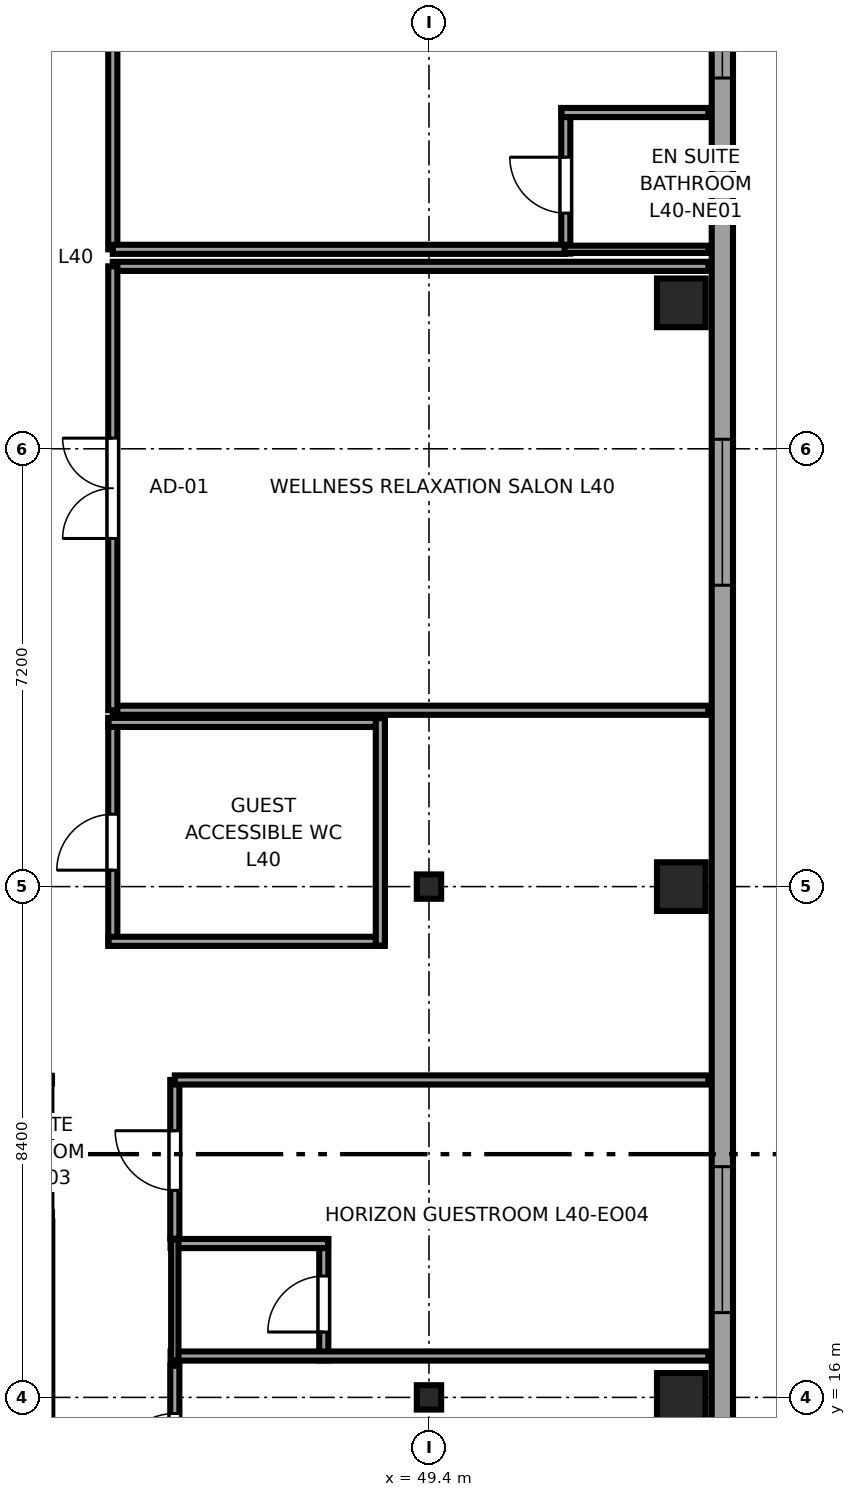
"""IFC4 building model, lengths in metres.
Left out: names, types, materials, properties, quantities, classifications, styles, units other than length and angle.
Written with IfcOpenShell. Run it as: python <this file> out.ifc"""

import sys

from ifc_helpers import new_model, si_unit, direction, frame, frame_2d, origin, origin_2d, place, context, subcontext, project, spatial, rectangle, i_section, extrude, source, transform, mapped, element, fill, save


model = new_model("IFC4")
c1 = context("Model", 3, precision=1e-05, world=origin(), true_north=direction((0.0, 1.0)))
c2 = subcontext(c1, "Body", "Model", "MODEL_VIEW")
j1 = project(units=[si_unit("LENGTHUNIT", "METRE"), si_unit("PLANEANGLEUNIT", "RADIAN")], contexts=[c1])
p1 = place(None, origin())
s1 = spatial("IfcSite", under=j1, at=p1, CompositionType="ELEMENT")
p2 = place(p1, origin())
s2 = spatial("IfcBuilding", under=s1, at=p2, CompositionType="ELEMENT")
p3 = place(p2, frame((0.0, 0.0, 154.15)))
s3 = spatial("IfcBuildingStorey", under=s2, at=p3, CompositionType="ELEMENT", Elevation=154.15)
m1 = source(origin(), c2, "Body", "SweptSolid", [
    extrude(i_section(OverallWidth=0.4, OverallDepth=0.4, WebThickness=0.02, FlangeThickness=0.035, at=origin_2d()), origin(), (0.0, 0.0, 1.0), 3.55),
])
for number, where, z_axis, x_axis in (
    (1, (49.4, 16.0, 0.0), (0.0, 0.0, 1.0), (1.0, 0.0, 0.0)),
    (2, (49.4, 24.4, 0.0), (0.0, 0.0, 1.0), (1.0, 0.0, 0.0)),
):
    element("IfcColumn", number, at=place(p3, frame(where, z_axis=z_axis, x_axis=x_axis)), inside=s3, PredefinedType="COLUMN", context=c2, shape_type="MappedRepresentation", body=[
        mapped(m1, transform((0.0, 0.0, 0.0), x_axis=(1.0, 0.0, 0.0), y_axis=(0.0, 1.0, 0.0), z_axis=(0.0, 0.0, 1.0), scale=1.0)),
    ])
m2 = source(origin(), c2, "Body", "SweptSolid", [
    extrude(rectangle(XDim=0.8, YDim=0.8, at=origin_2d()), origin(), (0.0, 0.0, 1.0), 3.55),
])
for number, where, z_axis, x_axis in (
    (3, (53.55, 16.0, 0.0), (0.0, 0.0, 1.0), (1.0, 0.0, 0.0)),
    (4, (53.55, 24.4, 0.0), (0.0, 0.0, 1.0), (1.0, 0.0, 0.0)),
    (5, (53.55, 34.0, 0.0), (0.0, 0.0, 1.0), (1.0, 0.0, 0.0)),
):
    element("IfcColumn", number, at=place(p3, frame(where, z_axis=z_axis, x_axis=x_axis)), inside=s3, PredefinedType="COLUMN", context=c2, shape_type="MappedRepresentation", body=[
        mapped(m2, transform((0.0, 0.0, 0.0), x_axis=(1.0, 0.0, 0.0), y_axis=(0.0, 1.0, 0.0), z_axis=(0.0, 0.0, 1.0), scale=1.0)),
    ])
p4 = place(p3, frame((54.225, 7.017, 0.0), z_axis=(0.0, 0.0, 1.0), x_axis=(0.0, 1.0, 0.0)))
e6 = element("IfcWall", 6, at=p4, inside=s3, PredefinedType="SOLIDWALL", context=c2, shape_type="SweptSolid", body=[
    extrude(rectangle(XDim=34.566, YDim=0.35, at=frame_2d((17.283, 0.0))), origin(), (0.0, 0.0, 1.0), 3.37),
])
p5 = place(p4, frame((2.035, 0.0, 0.68)))
e7 = element("IfcOpeningElement", 7, at=p5, cuts=e6, PredefinedType="OPENING", context=c2, shape_type="SweptSolid", body=[
    extrude(rectangle(XDim=2.4, YDim=1.9, at=frame_2d((1.2, 0.95))), frame((0.0, 0.185, 0.0), z_axis=(0.0, -1.0, 0.0), x_axis=(1.0, 0.0, 0.0)), (0.0, 0.0, 1.0), 0.37),
])
p6 = place(p4, frame((5.656, 0.0, 0.68)))
e8 = element("IfcOpeningElement", 8, at=p6, cuts=e6, PredefinedType="OPENING", context=c2, shape_type="SweptSolid", body=[
    extrude(rectangle(XDim=2.4, YDim=1.9, at=frame_2d((1.2, 0.95))), frame((0.0, 0.185, 0.0), z_axis=(0.0, -1.0, 0.0), x_axis=(1.0, 0.0, 0.0)), (0.0, 0.0, 1.0), 0.37),
])
p7 = place(p4, frame((10.377, 0.0, 0.68)))
e9 = element("IfcOpeningElement", 9, at=p7, cuts=e6, PredefinedType="OPENING", context=c2, shape_type="SweptSolid", body=[
    extrude(rectangle(XDim=2.4, YDim=1.9, at=frame_2d((1.2, 0.95))), frame((0.0, 0.185, 0.0), z_axis=(0.0, -1.0, 0.0), x_axis=(1.0, 0.0, 0.0)), (0.0, 0.0, 1.0), 0.37),
])
p8 = place(p4, frame((22.339, 0.0, 0.68)))
e10 = element("IfcOpeningElement", 10, at=p8, cuts=e6, PredefinedType="OPENING", context=c2, shape_type="SweptSolid", body=[
    extrude(rectangle(XDim=2.4, YDim=1.9, at=frame_2d((1.2, 0.95))), frame((0.0, 0.185, 0.0), z_axis=(0.0, -1.0, 0.0), x_axis=(1.0, 0.0, 0.0)), (0.0, 0.0, 1.0), 0.37),
])
p9 = place(p4, frame((30.68, 0.0, 0.68)))
e11 = element("IfcOpeningElement", 11, at=p9, cuts=e6, PredefinedType="OPENING", context=c2, shape_type="SweptSolid", body=[
    extrude(rectangle(XDim=2.4, YDim=1.9, at=frame_2d((1.2, 0.95))), frame((0.0, 0.185, 0.0), z_axis=(0.0, -1.0, 0.0), x_axis=(1.0, 0.0, 0.0)), (0.0, 0.0, 1.0), 0.37),
])
p10 = place(p3, frame((47.67, 16.61, 0.0), z_axis=(0.0, 0.0, 1.0), x_axis=(0.0, 1.0, 0.0)))
e12 = element("IfcWall", 12, at=p10, inside=s3, PredefinedType="PARTITIONING", context=c2, shape_type="SweptSolid", body=[
    extrude(rectangle(XDim=1.99, YDim=0.15, at=frame_2d((0.995, 0.0))), origin(), (0.0, 0.0, 1.0), 3.37),
])
p11 = place(p10, frame((0.465, 0.0, 0.0)))
e13 = element("IfcOpeningElement", 13, at=p11, cuts=e12, PredefinedType="OPENING", context=c2, shape_type="SweptSolid", body=[
    extrude(rectangle(XDim=0.92, YDim=2.01, at=frame_2d((0.46, 1.005))), frame((0.0, 0.085, 0.0), z_axis=(0.0, -1.0, 0.0), x_axis=(1.0, 0.0, 0.0)), (0.0, 0.0, 1.0), 0.17),
])
p12 = place(p3, frame((45.15, 16.68, 0.0), z_axis=(0.0, 0.0, 1.0), x_axis=(1.0, 0.0, 0.0)))
e14 = element("IfcWall", 14, at=p12, inside=s3, PredefinedType="PARTITIONING", context=c2, shape_type="SweptSolid", body=[
    extrude(rectangle(XDim=8.845, YDim=0.15, at=frame_2d((4.423, 0.0))), origin(), (0.0, 0.0, 1.0), 3.37),
])
p13 = place(p3, frame((45.15, 18.53, 0.0), z_axis=(0.0, 0.0, 1.0), x_axis=(1.0, 0.0, 0.0)))
e15 = element("IfcWall", 15, at=p13, inside=s3, PredefinedType="PARTITIONING", context=c2, shape_type="SweptSolid", body=[
    extrude(rectangle(XDim=2.59, YDim=0.15, at=frame_2d((1.295, 0.0))), origin(), (0.0, 0.0, 1.0), 3.37),
])
p14 = place(p3, frame((45.22, 16.61, 0.0), z_axis=(0.0, 0.0, 1.0), x_axis=(0.0, 1.0, 0.0)))
e16 = element("IfcWall", 16, at=p14, inside=s3, PredefinedType="PLUMBINGWALL", context=c2, shape_type="SweptSolid", body=[
    extrude(rectangle(XDim=1.99, YDim=0.12, at=frame_2d((0.995, 0.0))), origin(), (0.0, 0.0, 1.0), 3.37),
])
p15 = place(p3, frame((51.65, 34.81, 0.0), z_axis=(0.0, 0.0, 1.0), x_axis=(0.0, 1.0, 0.0)))
e17 = element("IfcWall", 17, at=p15, inside=s3, PredefinedType="PARTITIONING", context=c2, shape_type="SweptSolid", body=[
    extrude(rectangle(XDim=2.39, YDim=0.15, at=frame_2d((1.195, 0.0))), origin(), (0.0, 0.0, 1.0), 3.37),
])
p16 = place(p15, frame((0.665, 0.0, 0.0)))
e18 = element("IfcOpeningElement", 18, at=p16, cuts=e17, PredefinedType="OPENING", context=c2, shape_type="SweptSolid", body=[
    extrude(rectangle(XDim=0.92, YDim=2.01, at=frame_2d((0.46, 1.005))), frame((0.0, 0.085, 0.0), z_axis=(0.0, -1.0, 0.0), x_axis=(1.0, 0.0, 0.0)), (0.0, 0.0, 1.0), 0.17),
])
p17 = place(p3, frame((51.58, 34.88, 0.0), z_axis=(0.0, 0.0, 1.0), x_axis=(1.0, 0.0, 0.0)))
e19 = element("IfcWall", 19, at=p17, inside=s3, PredefinedType="PLUMBINGWALL", context=c2, shape_type="SweptSolid", body=[
    extrude(rectangle(XDim=2.415, YDim=0.12, at=frame_2d((1.208, 0.0))), origin(), (0.0, 0.0, 1.0), 3.37),
])
p18 = place(p3, frame((51.58, 37.13, 0.0), z_axis=(0.0, 0.0, 1.0), x_axis=(1.0, 0.0, 0.0)))
e20 = element("IfcWall", 20, at=p18, inside=s3, PredefinedType="PARTITIONING", context=c2, shape_type="SweptSolid", body=[
    extrude(rectangle(XDim=2.415, YDim=0.15, at=frame_2d((1.208, 0.0))), origin(), (0.0, 0.0, 1.0), 3.37),
])
p19 = place(p3, frame((43.13, 15.28, 0.0), z_axis=(0.0, 0.0, 1.0), x_axis=(0.0, 1.0, 0.0)))
e21 = element("IfcWall", 21, at=p19, inside=s3, PredefinedType="PARTITIONING", context=c2, shape_type="SweptSolid", body=[
    extrude(rectangle(XDim=3.61, YDim=0.15, at=frame_2d((1.805, 0.0))), origin(), (0.0, 0.0, 1.0), 3.37),
])
p20 = place(p19, frame((1.295, 0.0, 0.0)))
e22 = element("IfcOpeningElement", 22, at=p20, cuts=e21, PredefinedType="OPENING", context=c2, shape_type="SweptSolid", body=[
    extrude(rectangle(XDim=0.98, YDim=2.12, at=frame_2d((0.49, 1.06))), frame((0.0, 0.085, 0.0), z_axis=(0.0, -1.0, 0.0), x_axis=(1.0, 0.0, 0.0)), (0.0, 0.0, 1.0), 0.17),
])
p21 = place(p3, frame((45.22, 14.01, 0.0), z_axis=(0.0, 0.0, 1.0), x_axis=(0.0, 1.0, 0.0)))
e23 = element("IfcWall", 23, at=p21, inside=s3, PredefinedType="PARTITIONING", context=c2, shape_type="SweptSolid", body=[
    extrude(rectangle(XDim=2.51, YDim=0.15, at=frame_2d((1.255, 0.0))), origin(), (0.0, 0.0, 1.0), 3.37),
])
p22 = place(p21, frame((0.745, 0.0, 0.0)))
e24 = element("IfcOpeningElement", 24, at=p22, cuts=e23, PredefinedType="OPENING", context=c2, shape_type="SweptSolid", body=[
    extrude(rectangle(XDim=0.98, YDim=2.12, at=frame_2d((0.49, 1.06))), frame((0.0, 0.085, 0.0), z_axis=(0.0, -1.0, 0.0), x_axis=(1.0, 0.0, 0.0)), (0.0, 0.0, 1.0), 0.17),
])
p23 = place(p3, frame((45.22, 18.61, 0.0), z_axis=(0.0, 0.0, 1.0), x_axis=(0.0, 1.0, 0.0)))
e25 = element("IfcWall", 25, at=p23, inside=s3, PredefinedType="PARTITIONING", context=c2, shape_type="SweptSolid", body=[
    extrude(rectangle(XDim=2.61, YDim=0.15, at=frame_2d((1.305, 0.0))), origin(), (0.0, 0.0, 1.0), 3.37),
])
p24 = place(p23, frame((0.795, 0.0, 0.0)))
e26 = element("IfcOpeningElement", 26, at=p24, cuts=e25, PredefinedType="OPENING", context=c2, shape_type="SweptSolid", body=[
    extrude(rectangle(XDim=0.98, YDim=2.12, at=frame_2d((0.49, 1.06))), frame((0.0, 0.085, 0.0), z_axis=(0.0, -1.0, 0.0), x_axis=(1.0, 0.0, 0.0)), (0.0, 0.0, 1.0), 0.17),
])
p25 = place(p3, frame((45.22, 21.22, 0.0), z_axis=(0.0, 0.0, 1.0), x_axis=(1.0, 0.0, 0.0)))
e27 = element("IfcWall", 27, at=p25, inside=s3, PredefinedType="PARTITIONING", context=c2, shape_type="SweptSolid", body=[
    extrude(rectangle(XDim=8.775, YDim=0.15, at=frame_2d((4.388, 0.0))), origin(), (0.0, 0.0, 1.0), 3.37),
])
p26 = place(p3, frame((44.2, 23.43, 0.0), z_axis=(0.0, 0.0, 1.0), x_axis=(0.0, 1.0, 0.0)))
e28 = element("IfcWall", 28, at=p26, inside=s3, PredefinedType="PARTITIONING", context=c2, shape_type="SweptSolid", body=[
    extrude(rectangle(XDim=3.74, YDim=0.15, at=frame_2d((1.87, 0.0))), origin(), (0.0, 0.0, 1.0), 3.37),
])
p27 = place(p26, frame((1.24, 0.0, 0.0)))
e29 = element("IfcOpeningElement", 29, at=p27, cuts=e28, PredefinedType="OPENING", context=c2, shape_type="SweptSolid", body=[
    extrude(rectangle(XDim=0.92, YDim=2.01, at=frame_2d((0.46, 1.005))), frame((0.0, 0.085, 0.0), z_axis=(0.0, -1.0, 0.0), x_axis=(1.0, 0.0, 0.0)), (0.0, 0.0, 1.0), 0.17),
])
for number, where, z_axis, x_axis in (
    (30, (44.13, 23.5, 0.0), (0.0, 0.0, 1.0), (1.0, 0.0, 0.0)),
    (31, (44.13, 27.1, 0.0), (0.0, 0.0, 1.0), (1.0, 0.0, 0.0)),
):
    element("IfcWall", number, at=place(p3, frame(where, z_axis=z_axis, x_axis=x_axis)), inside=s3, PredefinedType="PARTITIONING", context=c2, shape_type="SweptSolid", body=[
        extrude(rectangle(XDim=4.54, YDim=0.15, at=frame_2d((2.27, 0.0))), origin(), (0.0, 0.0, 1.0), 3.37),
    ])
p28 = place(p3, frame((48.6, 23.43, 0.0), z_axis=(0.0, 0.0, 1.0), x_axis=(0.0, 1.0, 0.0)))
e32 = element("IfcWall", 32, at=p28, inside=s3, PredefinedType="PARTITIONING", context=c2, shape_type="SweptSolid", body=[
    extrude(rectangle(XDim=3.74, YDim=0.15, at=frame_2d((1.87, 0.0))), origin(), (0.0, 0.0, 1.0), 3.37),
])
for number, where, z_axis, x_axis in (
    (33, (44.2, 27.3, 0.0), (0.0, 0.0, 1.0), (1.0, 0.0, 0.0)),
    (34, (44.2, 34.6, 0.0), (0.0, 0.0, 1.0), (1.0, 0.0, 0.0)),
):
    element("IfcWall", number, at=place(p3, frame(where, z_axis=z_axis, x_axis=x_axis)), inside=s3, PredefinedType="PARTITIONING", context=c2, shape_type="SweptSolid", body=[
        extrude(rectangle(XDim=9.795, YDim=0.15, at=frame_2d((4.897, 0.0))), origin(), (0.0, 0.0, 1.0), 3.37),
    ])
p29 = place(p3, frame((44.2, 27.3, 0.0), z_axis=(0.0, 0.0, 1.0), x_axis=(0.0, 1.0, 0.0)))
e35 = element("IfcWall", 35, at=p29, inside=s3, PredefinedType="PARTITIONING", context=c2, shape_type="SweptSolid", body=[
    extrude(rectangle(XDim=7.3, YDim=0.15, at=frame_2d((3.65, 0.0))), origin(), (0.0, 0.0, 1.0), 3.37),
])
p30 = place(p29, frame((2.825, 0.0, 0.0)))
e36 = element("IfcOpeningElement", 36, at=p30, cuts=e35, PredefinedType="OPENING", context=c2, shape_type="SweptSolid", body=[
    extrude(rectangle(XDim=1.65, YDim=2.15, at=frame_2d((0.825, 1.075))), frame((0.0, 0.085, 0.0), z_axis=(0.0, -1.0, 0.0), x_axis=(1.0, 0.0, 0.0)), (0.0, 0.0, 1.0), 0.17),
])
p31 = place(p3, frame((44.2, 34.88, 0.0), z_axis=(0.0, 0.0, 1.0), x_axis=(0.0, 1.0, 0.0)))
e37 = element("IfcWall", 37, at=p31, inside=s3, PredefinedType="PARTITIONING", context=c2, shape_type="SweptSolid", body=[
    extrude(rectangle(XDim=9.33, YDim=0.15, at=frame_2d((4.665, 0.0))), origin(), (0.0, 0.0, 1.0), 3.37),
])
p32 = place(p31, frame((4.12, 0.0, 0.0)))
e38 = element("IfcOpeningElement", 38, at=p32, cuts=e37, PredefinedType="OPENING", context=c2, shape_type="SweptSolid", body=[
    extrude(rectangle(XDim=0.98, YDim=2.12, at=frame_2d((0.49, 1.06))), frame((0.0, 0.085, 0.0), z_axis=(0.0, -1.0, 0.0), x_axis=(1.0, 0.0, 0.0)), (0.0, 0.0, 1.0), 0.17),
])
p33 = place(p3, frame((44.2, 34.88, 0.0), z_axis=(0.0, 0.0, 1.0), x_axis=(1.0, 0.0, 0.0)))
e39 = element("IfcWall", 39, at=p33, inside=s3, PredefinedType="PARTITIONING", context=c2, shape_type="SweptSolid", body=[
    extrude(rectangle(XDim=7.43, YDim=0.15, at=frame_2d((3.715, 0.0))), origin(), (0.0, 0.0, 1.0), 3.37),
])
m3 = source(origin(), c2, "Body", "SweptSolid", [
    extrude(rectangle(XDim=2.4, YDim=1.9, at=frame_2d((1.2, 0.95))), frame((0.0, 0.09, 0.0), z_axis=(0.0, -1.0, 0.0), x_axis=(1.0, 0.0, 0.0)), (0.0, 0.0, 1.0), 0.06),
])
p34 = place(p7, origin())
e40 = element("IfcWindow", 40, at=p34, inside=s3, PartitioningType="TRIPLE_PANEL_HORIZONTAL", PredefinedType="WINDOW", context=c2, shape_type="MappedRepresentation", body=[
    mapped(m3, transform((0.0, 0.0, 0.0), x_axis=(1.0, 0.0, 0.0), y_axis=(0.0, 1.0, 0.0), z_axis=(0.0, 0.0, 1.0), scale=1.0)),
])
fill(e9, e40)
p35 = place(p8, origin())
e41 = element("IfcWindow", 41, at=p35, inside=s3, PartitioningType="TRIPLE_PANEL_HORIZONTAL", PredefinedType="WINDOW", context=c2, shape_type="MappedRepresentation", body=[
    mapped(m3, transform((0.0, 0.0, 0.0), x_axis=(1.0, 0.0, 0.0), y_axis=(0.0, 1.0, 0.0), z_axis=(0.0, 0.0, 1.0), scale=1.0)),
])
fill(e10, e41)
p36 = place(p9, origin())
e42 = element("IfcWindow", 42, at=p36, inside=s3, PartitioningType="TRIPLE_PANEL_HORIZONTAL", PredefinedType="WINDOW", context=c2, shape_type="MappedRepresentation", body=[
    mapped(m3, transform((0.0, 0.0, 0.0), x_axis=(1.0, 0.0, 0.0), y_axis=(0.0, 1.0, 0.0), z_axis=(0.0, 0.0, 1.0), scale=1.0)),
])
fill(e11, e42)
m4 = source(origin(), c2, "Body", "SweptSolid", [
    extrude(rectangle(XDim=0.92, YDim=2.01, at=frame_2d((0.46, 1.005))), frame((0.0, 0.025, 0.0), z_axis=(0.0, -1.0, 0.0), x_axis=(1.0, 0.0, 0.0)), (0.0, 0.0, 1.0), 0.05),
])
p37 = place(p11, origin())
e43 = element("IfcDoor", 43, at=p37, inside=s3, OperationType="SINGLE_SWING_LEFT", PredefinedType="DOOR", context=c2, shape_type="MappedRepresentation", body=[
    mapped(m4, transform((0.0, 0.0, 0.0), x_axis=(1.0, 0.0, 0.0), y_axis=(0.0, 1.0, 0.0), z_axis=(0.0, 0.0, 1.0), scale=1.0)),
])
fill(e13, e43)
p38 = place(p16, origin())
e44 = element("IfcDoor", 44, at=p38, inside=s3, OperationType="SINGLE_SWING_RIGHT", PredefinedType="DOOR", context=c2, shape_type="MappedRepresentation", body=[
    mapped(m4, transform((0.0, 0.0, 0.0), x_axis=(1.0, 0.0, 0.0), y_axis=(0.0, 1.0, 0.0), z_axis=(0.0, 0.0, 1.0), scale=1.0)),
])
fill(e18, e44)
m5 = source(origin(), c2, "Body", "SweptSolid", [
    extrude(rectangle(XDim=0.98, YDim=2.12, at=frame_2d((0.49, 1.06))), frame((0.0, 0.025, 0.0), z_axis=(0.0, -1.0, 0.0), x_axis=(1.0, 0.0, 0.0)), (0.0, 0.0, 1.0), 0.05),
])
p39 = place(p22, origin())
e45 = element("IfcDoor", 45, at=p39, inside=s3, OperationType="SINGLE_SWING_LEFT", PredefinedType="DOOR", context=c2, shape_type="MappedRepresentation", body=[
    mapped(m5, transform((0.0, 0.0, 0.0), x_axis=(1.0, 0.0, 0.0), y_axis=(0.0, 1.0, 0.0), z_axis=(0.0, 0.0, 1.0), scale=1.0)),
])
fill(e24, e45)
p40 = place(p24, origin())
e46 = element("IfcDoor", 46, at=p40, inside=s3, OperationType="SINGLE_SWING_RIGHT", PredefinedType="DOOR", context=c2, shape_type="MappedRepresentation", body=[
    mapped(m5, transform((0.0, 0.0, 0.0), x_axis=(1.0, 0.0, 0.0), y_axis=(0.0, 1.0, 0.0), z_axis=(0.0, 0.0, 1.0), scale=1.0)),
])
fill(e26, e46)
p41 = place(p27, origin())
e47 = element("IfcDoor", 47, at=p41, inside=s3, OperationType="SINGLE_SWING_LEFT", PredefinedType="DOOR", context=c2, shape_type="MappedRepresentation", body=[
    mapped(m4, transform((0.0, 0.0, 0.0), x_axis=(1.0, 0.0, 0.0), y_axis=(0.0, 1.0, 0.0), z_axis=(0.0, 0.0, 1.0), scale=1.0)),
])
fill(e29, e47)
m6 = source(origin(), c2, "Body", "SweptSolid", [
    extrude(rectangle(XDim=1.65, YDim=2.15, at=frame_2d((0.825, 1.075))), frame((0.0, 0.025, 0.0), z_axis=(0.0, -1.0, 0.0), x_axis=(1.0, 0.0, 0.0)), (0.0, 0.0, 1.0), 0.05),
])
p42 = place(p30, origin())
e48 = element("IfcDoor", 48, at=p42, inside=s3, OperationType="DOUBLE_DOOR_SINGLE_SWING", PredefinedType="DOOR", context=c2, shape_type="MappedRepresentation", body=[
    mapped(m6, transform((0.0, 0.0, 0.0), x_axis=(1.0, 0.0, 0.0), y_axis=(0.0, 1.0, 0.0), z_axis=(0.0, 0.0, 1.0), scale=1.0)),
])
fill(e36, e48)
save(model, sys.argv[1])
